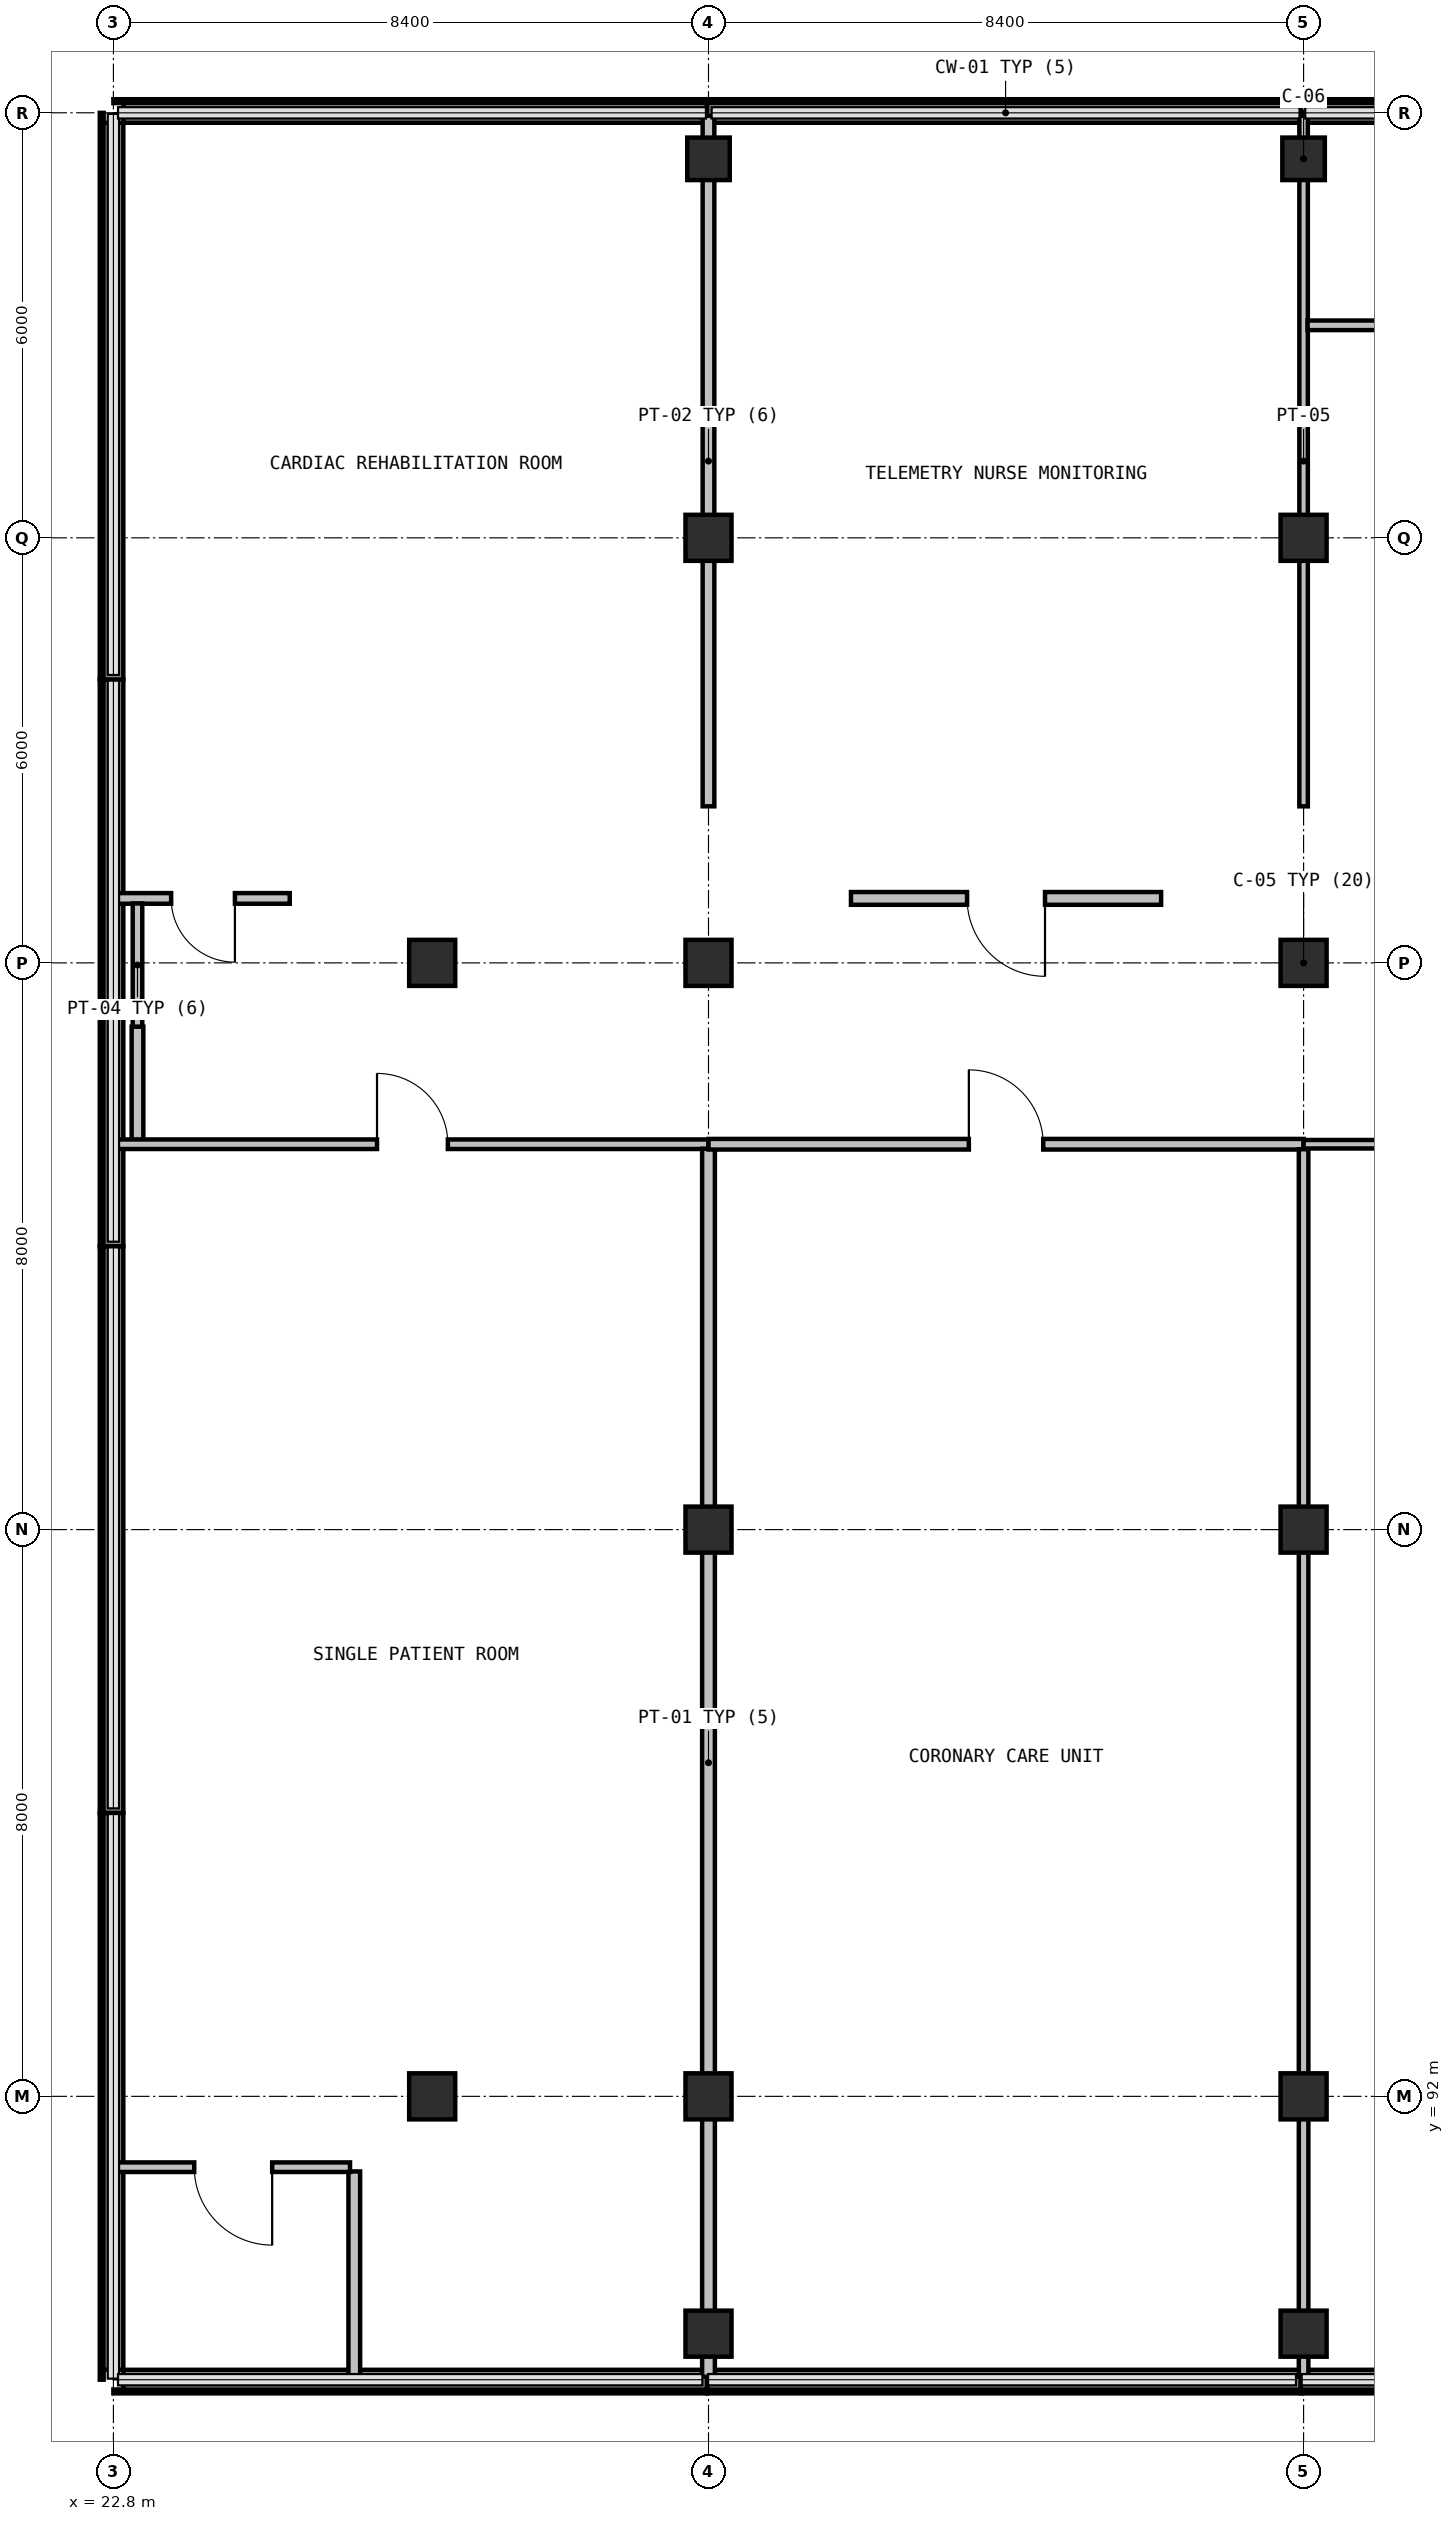
"""IFC4 building model, lengths in metres.
Left out: names, types, materials, properties, quantities, classifications, styles, units other than length and angle.
Written with IfcOpenShell. Run it as: python <this file> out.ifc"""

import sys

from ifc_helpers import new_model, si_unit, direction, frame, frame_2d, origin, origin_2d, place, context, subcontext, project, spatial, rectangle, extrude, element, fill, save


model = new_model("IFC4")
c1 = context("Model", 3, precision=1e-05, world=origin(), true_north=direction((0.0, 1.0)))
c2 = subcontext(c1, "Body", "Model", "MODEL_VIEW")
j1 = project(units=[si_unit("LENGTHUNIT", "METRE"), si_unit("PLANEANGLEUNIT", "RADIAN")], contexts=[c1])
p1 = place(None, origin())
s1 = spatial("IfcSite", under=j1, at=p1, CompositionType="ELEMENT")
p2 = place(p1, origin())
s2 = spatial("IfcBuilding", under=s1, at=p2, CompositionType="ELEMENT")
p3 = place(p2, frame((0.0, 0.0, 27.3)))
s3 = spatial("IfcBuildingStorey", under=s2, at=p3, CompositionType="ELEMENT", Elevation=27.3)
for number, where, z_axis, x_axis in (
    (1, (27.3, 92.0, 0.0), (0.0, 0.0, 1.0), (1.0, 0.0, 0.0)),
    (2, (27.3, 108.0, 0.0), (0.0, 0.0, 1.0), (1.0, 0.0, 0.0)),
    (3, (31.2, 88.65, 0.0), (0.0, 0.0, 1.0), (1.0, 0.0, 0.0)),
    (4, (31.2, 92.0, 0.0), (0.0, 0.0, 1.0), (1.0, 0.0, 0.0)),
    (5, (31.2, 100.0, 0.0), (0.0, 0.0, 1.0), (1.0, 0.0, 0.0)),
    (6, (31.2, 108.0, 0.0), (0.0, 0.0, 1.0), (1.0, 0.0, 0.0)),
    (7, (31.2, 114.0, 0.0), (0.0, 0.0, 1.0), (1.0, 0.0, 0.0)),
):
    element("IfcColumn", number, at=place(p3, frame(where, z_axis=z_axis, x_axis=x_axis)), inside=s3, PredefinedType="COLUMN", context=c2, shape_type="SweptSolid", body=[
        extrude(rectangle(XDim=0.65, YDim=0.65, at=origin_2d()), origin(), (0.0, 0.0, 1.0), 4.05),
    ])
p4 = place(p3, frame((31.2, 119.35, 0.0), z_axis=(0.0, 0.0, 1.0), x_axis=(1.0, 0.0, 0.0)))
e8 = element("IfcColumn", 8, at=p4, inside=s3, PredefinedType="COLUMN", context=c2, shape_type="SweptSolid", body=[
    extrude(rectangle(XDim=0.6, YDim=0.6, at=origin_2d()), origin(), (0.0, 0.0, 1.0), 4.05),
])
for number, where, z_axis, x_axis in (
    (9, (39.6, 88.65, 0.0), (0.0, 0.0, 1.0), (1.0, 0.0, 0.0)),
    (10, (39.6, 92.0, 0.0), (0.0, 0.0, 1.0), (1.0, 0.0, 0.0)),
    (11, (39.6, 100.0, 0.0), (0.0, 0.0, 1.0), (1.0, 0.0, 0.0)),
    (12, (39.6, 108.0, 0.0), (0.0, 0.0, 1.0), (1.0, 0.0, 0.0)),
    (13, (39.6, 114.0, 0.0), (0.0, 0.0, 1.0), (1.0, 0.0, 0.0)),
):
    element("IfcColumn", number, at=place(p3, frame(where, z_axis=z_axis, x_axis=x_axis)), inside=s3, PredefinedType="COLUMN", context=c2, shape_type="SweptSolid", body=[
        extrude(rectangle(XDim=0.65, YDim=0.65, at=origin_2d()), origin(), (0.0, 0.0, 1.0), 4.05),
    ])
p5 = place(p3, frame((39.6, 119.35, 0.0), z_axis=(0.0, 0.0, 1.0), x_axis=(1.0, 0.0, 0.0)))
e14 = element("IfcColumn", 14, at=p5, inside=s3, PredefinedType="COLUMN", context=c2, shape_type="SweptSolid", body=[
    extrude(rectangle(XDim=0.6, YDim=0.6, at=origin_2d()), origin(), (0.0, 0.0, 1.0), 4.05),
])
p6 = place(p3, frame((22.8, 88.14, 0.0), z_axis=(0.0, 0.0, 1.0), x_axis=(0.0, 1.0, 0.0)))
e15 = element("IfcWall", 15, at=p6, inside=s3, PredefinedType="SOLIDWALL", context=c2, shape_type="SweptSolid", body=[
    extrude(rectangle(XDim=7.858, YDim=0.28, at=frame_2d((3.929, 0.0))), origin(), (0.0, 0.0, 1.0), 0.94),
])
p7 = place(p3, frame((22.8, 96.002, 0.0), z_axis=(0.0, 0.0, 1.0), x_axis=(0.0, 1.0, 0.0)))
e16 = element("IfcWall", 16, at=p7, inside=s3, PredefinedType="SOLIDWALL", context=c2, shape_type="SweptSolid", body=[
    extrude(rectangle(XDim=7.995, YDim=0.28, at=frame_2d((3.998, 0.0))), origin(), (0.0, 0.0, 1.0), 0.94),
])
p8 = place(p3, frame((22.8, 104.001, 0.0), z_axis=(0.0, 0.0, 1.0), x_axis=(0.0, 1.0, 0.0)))
e17 = element("IfcWall", 17, at=p8, inside=s3, PredefinedType="SOLIDWALL", context=c2, shape_type="SweptSolid", body=[
    extrude(rectangle(XDim=7.996, YDim=0.28, at=frame_2d((3.998, 0.0))), origin(), (0.0, 0.0, 1.0), 0.94),
])
p9 = place(p3, frame((22.8, 112.001, 0.0), z_axis=(0.0, 0.0, 1.0), x_axis=(0.0, 1.0, 0.0)))
e18 = element("IfcWall", 18, at=p9, inside=s3, PredefinedType="SOLIDWALL", context=c2, shape_type="SweptSolid", body=[
    extrude(rectangle(XDim=7.858, YDim=0.28, at=frame_2d((3.929, 0.0))), origin(), (0.0, 0.0, 1.0), 0.94),
])
p10 = place(p3, frame((22.94, 119.999, 0.0), z_axis=(0.0, 0.0, 1.0), x_axis=(1.0, 0.0, 0.0)))
e19 = element("IfcWall", 19, at=p10, inside=s3, PredefinedType="SOLIDWALL", context=c2, shape_type="SweptSolid", body=[
    extrude(rectangle(XDim=8.237, YDim=0.28, at=frame_2d((4.119, 0.0))), origin(), (0.0, 0.0, 1.0), 0.94),
])
for number, where, z_axis, x_axis in (
    (20, (31.181, 119.999, 0.0), (0.0, 0.0, 1.0), (1.0, 0.0, 0.0)),
    (21, (39.56, 119.999, 0.0), (0.0, 0.0, 1.0), (1.0, 0.0, 0.0)),
    (22, (47.935, 88.0, 0.0), (0.0, 0.0, 1.0), (-1.0, 0.0, 0.0)),
    (23, (39.556, 88.0, 0.0), (0.0, 0.0, 1.0), (-1.0, 0.0, 0.0)),
):
    element("IfcWall", number, at=place(p3, frame(where, z_axis=z_axis, x_axis=x_axis)), inside=s3, PredefinedType="SOLIDWALL", context=c2, shape_type="SweptSolid", body=[
        extrude(rectangle(XDim=8.375, YDim=0.28, at=frame_2d((4.188, 0.0))), origin(), (0.0, 0.0, 1.0), 0.94),
    ])
p11 = place(p3, frame((31.177, 88.0, 0.0), z_axis=(0.0, 0.0, 1.0), x_axis=(-1.0, 0.0, 0.0)))
e24 = element("IfcWall", 24, at=p11, inside=s3, PredefinedType="SOLIDWALL", context=c2, shape_type="SweptSolid", body=[
    extrude(rectangle(XDim=8.237, YDim=0.28, at=frame_2d((4.119, 0.0))), origin(), (0.0, 0.0, 1.0), 0.94),
])
p12 = place(p3, frame((23.14, 107.1, 0.0), z_axis=(0.0, 0.0, 1.0), x_axis=(0.0, -1.0, 0.0)))
e25 = element("IfcWall", 25, at=p12, inside=s3, PredefinedType="PARTITIONING", context=c2, shape_type="SweptSolid", body=[
    extrude(rectangle(XDim=1.6, YDim=0.165, at=frame_2d((0.8, 0.0))), origin(), (0.0, 0.0, 1.0), 3.78),
])
p13 = place(p3, frame((22.842, 105.44, 0.0), z_axis=(0.0, 0.0, 1.0), x_axis=(1.0, 0.0, 0.0)))
e26 = element("IfcWall", 26, at=p13, inside=s3, PredefinedType="PARTITIONING", context=c2, shape_type="SweptSolid", body=[
    extrude(rectangle(XDim=8.358, YDim=0.135, at=frame_2d((4.179, 0.0))), origin(), (0.0, 0.0, 1.0), 3.78),
])
p14 = place(p13, frame((3.679, 0.0, 0.0)))
e27 = element("IfcOpeningElement", 27, at=p14, cuts=e26, PredefinedType="OPENING", context=c2, shape_type="SweptSolid", body=[
    extrude(rectangle(XDim=1.0, YDim=2.15, at=frame_2d((0.5, 1.075))), frame((0.0, 0.077, 0.0), z_axis=(0.0, -1.0, 0.0), x_axis=(1.0, 0.0, 0.0)), (0.0, 0.0, 1.0), 0.155),
])
p15 = place(p3, frame((31.2, 105.376, 0.0), z_axis=(0.0, 0.0, 1.0), x_axis=(0.0, -1.0, 0.0)))
e28 = element("IfcWall", 28, at=p15, inside=s3, PredefinedType="PARTITIONING", context=c2, shape_type="SweptSolid", body=[
    extrude(rectangle(XDim=17.334, YDim=0.18, at=frame_2d((8.667, 0.0))), origin(), (0.0, 0.0, 1.0), 3.18),
])
p16 = place(p3, frame((26.2, 88.042, 0.0), z_axis=(0.0, 0.0, 1.0), x_axis=(0.0, 1.0, 0.0)))
e29 = element("IfcWall", 29, at=p16, inside=s3, PredefinedType="PARTITIONING", context=c2, shape_type="SweptSolid", body=[
    extrude(rectangle(XDim=2.898, YDim=0.165, at=frame_2d((1.449, 0.0))), origin(), (0.0, 0.0, 1.0), 3.78),
])
p17 = place(p3, frame((26.14, 91.0, 0.0), z_axis=(0.0, 0.0, 1.0), x_axis=(-1.0, 0.0, 0.0)))
e30 = element("IfcWall", 30, at=p17, inside=s3, PredefinedType="PARTITIONING", context=c2, shape_type="SweptSolid", body=[
    extrude(rectangle(XDim=3.298, YDim=0.135, at=frame_2d((1.649, 0.0))), origin(), (0.0, 0.0, 1.0), 3.78),
])
p18 = place(p17, frame((1.099, 0.0, 0.0)))
e31 = element("IfcOpeningElement", 31, at=p18, cuts=e30, PredefinedType="OPENING", context=c2, shape_type="SweptSolid", body=[
    extrude(rectangle(XDim=1.1, YDim=2.15, at=frame_2d((0.55, 1.075))), frame((0.0, 0.077, 0.0), z_axis=(0.0, -1.0, 0.0), x_axis=(1.0, 0.0, 0.0)), (0.0, 0.0, 1.0), 0.155),
])
p19 = place(p3, frame((31.2, 105.44, 0.0), z_axis=(0.0, 0.0, 1.0), x_axis=(1.0, 0.0, 0.0)))
e32 = element("IfcWall", 32, at=p19, inside=s3, PredefinedType="PARTITIONING", context=c2, shape_type="SweptSolid", body=[
    extrude(rectangle(XDim=8.4, YDim=0.15, at=frame_2d((4.2, 0.0))), origin(), (0.0, 0.0, 1.0), 3.78),
])
p20 = place(p19, frame((3.675, 0.0, 0.0)))
e33 = element("IfcOpeningElement", 33, at=p20, cuts=e32, PredefinedType="OPENING", context=c2, shape_type="SweptSolid", body=[
    extrude(rectangle(XDim=1.05, YDim=2.15, at=frame_2d((0.525, 1.075))), frame((0.0, 0.085, 0.0), z_axis=(0.0, -1.0, 0.0), x_axis=(1.0, 0.0, 0.0)), (0.0, 0.0, 1.0), 0.17),
])
p21 = place(p3, frame((39.6, 105.369, 0.0), z_axis=(0.0, 0.0, 1.0), x_axis=(0.0, -1.0, 0.0)))
e34 = element("IfcWall", 34, at=p21, inside=s3, PredefinedType="PARTITIONING", context=c2, shape_type="SweptSolid", body=[
    extrude(rectangle(XDim=17.327, YDim=0.135, at=frame_2d((8.664, 0.0))), origin(), (0.0, 0.0, 1.0), 3.18),
])
p22 = place(p3, frame((39.6, 105.44, 0.0), z_axis=(0.0, 0.0, 1.0), x_axis=(1.0, 0.0, 0.0)))
e35 = element("IfcWall", 35, at=p22, inside=s3, PredefinedType="PARTITIONING", context=c2, shape_type="SweptSolid", body=[
    extrude(rectangle(XDim=6.915, YDim=0.12, at=frame_2d((3.458, 0.0))), origin(), (0.0, 0.0, 1.0), 3.78),
])
p23 = place(p22, frame((2.832, 0.0, 0.0)))
e36 = element("IfcOpeningElement", 36, at=p23, cuts=e35, PredefinedType="OPENING", context=c2, shape_type="SweptSolid", body=[
    extrude(rectangle(XDim=1.25, YDim=2.15, at=frame_2d((0.625, 1.075))), frame((0.0, 0.07, 0.0), z_axis=(0.0, -1.0, 0.0), x_axis=(1.0, 0.0, 0.0)), (0.0, 0.0, 1.0), 0.14),
])
p24 = place(p3, frame((31.2, 119.957, 0.0), z_axis=(0.0, 0.0, 1.0), x_axis=(0.0, -1.0, 0.0)))
e37 = element("IfcWall", 37, at=p24, inside=s3, PredefinedType="PARTITIONING", context=c2, shape_type="SweptSolid", body=[
    extrude(rectangle(XDim=9.747, YDim=0.165, at=frame_2d((4.874, 0.0))), origin(), (0.0, 0.0, 1.0), 3.18),
])
p25 = place(p3, frame((25.289, 108.91, 0.0), z_axis=(0.0, 0.0, 1.0), x_axis=(-1.0, 0.0, 0.0)))
e38 = element("IfcWall", 38, at=p25, inside=s3, PredefinedType="PARTITIONING", context=c2, shape_type="SweptSolid", body=[
    extrude(rectangle(XDim=2.447, YDim=0.15, at=frame_2d((1.224, 0.0))), origin(), (0.0, 0.0, 1.0), 3.78),
])
p26 = place(p25, frame((0.774, 0.0, 0.0)))
e39 = element("IfcOpeningElement", 39, at=p26, cuts=e38, PredefinedType="OPENING", context=c2, shape_type="SweptSolid", body=[
    extrude(rectangle(XDim=0.9, YDim=2.1, at=frame_2d((0.45, 1.05))), frame((0.0, 0.085, 0.0), z_axis=(0.0, -1.0, 0.0), x_axis=(1.0, 0.0, 0.0)), (0.0, 0.0, 1.0), 0.17),
])
p27 = place(p3, frame((23.14, 108.839, 0.0), z_axis=(0.0, 0.0, 1.0), x_axis=(0.0, -1.0, 0.0)))
e40 = element("IfcWall", 40, at=p27, inside=s3, PredefinedType="PARTITIONING", context=c2, shape_type="SweptSolid", body=[
    extrude(rectangle(XDim=1.739, YDim=0.135, at=frame_2d((0.87, 0.0))), origin(), (0.0, 0.0, 1.0), 3.78),
])
p28 = place(p3, frame((39.6, 119.957, 0.0), z_axis=(0.0, 0.0, 1.0), x_axis=(0.0, -1.0, 0.0)))
e41 = element("IfcWall", 41, at=p28, inside=s3, PredefinedType="PARTITIONING", context=c2, shape_type="SweptSolid", body=[
    extrude(rectangle(XDim=9.747, YDim=0.12, at=frame_2d((4.874, 0.0))), origin(), (0.0, 0.0, 1.0), 3.18),
])
p29 = place(p3, frame((37.589, 108.91, 0.0), z_axis=(0.0, 0.0, 1.0), x_axis=(-1.0, 0.0, 0.0)))
e42 = element("IfcWall", 42, at=p29, inside=s3, PredefinedType="PARTITIONING", context=c2, shape_type="SweptSolid", body=[
    extrude(rectangle(XDim=4.378, YDim=0.18, at=frame_2d((2.189, 0.0))), origin(), (0.0, 0.0, 1.0), 3.78),
])
p30 = place(p29, frame((1.639, 0.0, 0.0)))
e43 = element("IfcOpeningElement", 43, at=p30, cuts=e42, PredefinedType="OPENING", context=c2, shape_type="SweptSolid", body=[
    extrude(rectangle(XDim=1.1, YDim=2.15, at=frame_2d((0.55, 1.075))), frame((0.0, 0.1, 0.0), z_axis=(0.0, -1.0, 0.0), x_axis=(1.0, 0.0, 0.0)), (0.0, 0.0, 1.0), 0.2),
])
p31 = place(p3, frame((39.656, 117.0, 0.0), z_axis=(0.0, 0.0, 1.0), x_axis=(1.0, 0.0, 0.0)))
e44 = element("IfcWall", 44, at=p31, inside=s3, PredefinedType="PARTITIONING", context=c2, shape_type="SweptSolid", body=[
    extrude(rectangle(XDim=3.144, YDim=0.135, at=frame_2d((1.572, 0.0))), origin(), (0.0, 0.0, 1.0), 3.78),
])
p32 = place(p31, frame((0.972, 0.0, 0.0)))
e45 = element("IfcOpeningElement", 45, at=p32, cuts=e44, PredefinedType="OPENING", context=c2, shape_type="SweptSolid", body=[
    extrude(rectangle(XDim=1.2, YDim=2.15, at=frame_2d((0.6, 1.075))), frame((0.0, 0.077, 0.0), z_axis=(0.0, -1.0, 0.0), x_axis=(1.0, 0.0, 0.0)), (0.0, 0.0, 1.0), 0.155),
])
p33 = place(p14, origin())
e46 = element("IfcDoor", 46, at=p33, inside=s3, OperationType="SINGLE_SWING_LEFT", PredefinedType="DOOR", context=c2, shape_type="SweptSolid", body=[
    extrude(rectangle(XDim=1.0, YDim=2.15, at=frame_2d((0.5, 1.075))), frame((0.0, 0.025, 0.0), z_axis=(0.0, -1.0, 0.0), x_axis=(1.0, 0.0, 0.0)), (0.0, 0.0, 1.0), 0.05),
])
fill(e27, e46)
p34 = place(p18, origin())
e47 = element("IfcDoor", 47, at=p34, inside=s3, OperationType="SINGLE_SWING_RIGHT", PredefinedType="DOOR", context=c2, shape_type="SweptSolid", body=[
    extrude(rectangle(XDim=1.1, YDim=2.15, at=frame_2d((0.55, 1.075))), frame((0.0, 0.025, 0.0), z_axis=(0.0, -1.0, 0.0), x_axis=(1.0, 0.0, 0.0)), (0.0, 0.0, 1.0), 0.05),
])
fill(e31, e47)
p35 = place(p20, origin())
e48 = element("IfcDoor", 48, at=p35, inside=s3, OperationType="SINGLE_SWING_LEFT", PredefinedType="DOOR", context=c2, shape_type="SweptSolid", body=[
    extrude(rectangle(XDim=1.05, YDim=2.15, at=frame_2d((0.525, 1.075))), frame((0.0, 0.025, 0.0), z_axis=(0.0, -1.0, 0.0), x_axis=(1.0, 0.0, 0.0)), (0.0, 0.0, 1.0), 0.05),
])
fill(e33, e48)
p36 = place(p26, origin())
e49 = element("IfcDoor", 49, at=p36, inside=s3, OperationType="SINGLE_SWING_LEFT", PredefinedType="DOOR", context=c2, shape_type="SweptSolid", body=[
    extrude(rectangle(XDim=0.9, YDim=2.1, at=frame_2d((0.45, 1.05))), frame((0.0, 0.025, 0.0), z_axis=(0.0, -1.0, 0.0), x_axis=(1.0, 0.0, 0.0)), (0.0, 0.0, 1.0), 0.05),
])
fill(e39, e49)
p37 = place(p30, origin())
e50 = element("IfcDoor", 50, at=p37, inside=s3, OperationType="SINGLE_SWING_RIGHT", PredefinedType="DOOR", context=c2, shape_type="SweptSolid", body=[
    extrude(rectangle(XDim=1.1, YDim=2.15, at=frame_2d((0.55, 1.075))), frame((0.0, 0.025, 0.0), z_axis=(0.0, -1.0, 0.0), x_axis=(1.0, 0.0, 0.0)), (0.0, 0.0, 1.0), 0.05),
])
fill(e43, e50)
save(model, sys.argv[1])
